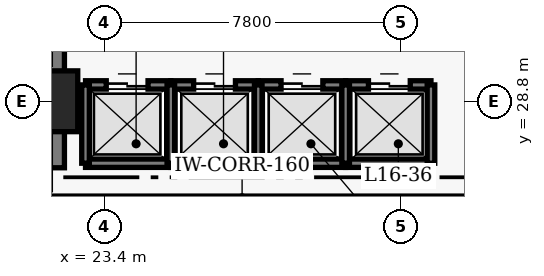
"""IFC4 building model, lengths in metres.
Left out: names, types, materials, properties, quantities, classifications, styles, units other than length and angle.
Written with IfcOpenShell. Run it as: python <this file> out.ifc"""

import sys

from ifc_helpers import new_model, si_unit, direction, frame, frame_2d, origin, origin_2d, place, context, subcontext, project, spatial, rectangle, extrude, element, fill, save


model = new_model("IFC4")
c1 = context("Model", 3, precision=1e-05, world=origin(), true_north=direction((0.0, 1.0)))
c2 = subcontext(c1, "Body", "Model", "MODEL_VIEW")
j1 = project(units=[si_unit("LENGTHUNIT", "METRE"), si_unit("PLANEANGLEUNIT", "RADIAN")], contexts=[c1])
p1 = place(None, origin())
s1 = spatial("IfcSite", under=j1, at=p1, CompositionType="ELEMENT")
p2 = place(p1, origin())
s2 = spatial("IfcBuilding", under=s1, at=p2, CompositionType="ELEMENT")
p3 = place(p2, frame((0.0, 0.0, 67.8)))
s3 = spatial("IfcBuildingStorey", under=s2, at=p3, CompositionType="ELEMENT", Elevation=67.8)
p4 = place(p3, frame((21.9, 27.05, 0.0), z_axis=(0.0, 0.0, 1.0), x_axis=(0.0, 1.0, 0.0)))
e1 = element("IfcWall", 1, at=p4, inside=s3, PredefinedType="SHEAR", context=c2, shape_type="SweptSolid", body=[
    extrude(rectangle(XDim=13.72, YDim=0.9, at=frame_2d((6.86, 0.0))), origin(), (0.0, 0.0, 1.0), 3.8),
])
p5 = place(p3, frame((21.9, 28.8, 0.0), z_axis=(0.0, 0.0, 1.0), x_axis=(1.0, 0.0, 0.0)))
e2 = element("IfcColumn", 2, at=p5, inside=s3, PredefinedType="COLUMN", context=c2, shape_type="SweptSolid", body=[
    extrude(rectangle(XDim=1.6, YDim=1.6, at=origin_2d()), origin(), (0.0, 0.0, 1.0), 3.8),
])
p6 = place(p3, frame((22.905, 29.23, 0.0), z_axis=(0.0, 0.0, 1.0), x_axis=(1.0, 0.0, 0.0)))
e3 = element("IfcWall", 3, at=p6, inside=s3, PredefinedType="SHEAR", context=c2, shape_type="SweptSolid", body=[
    extrude(rectangle(XDim=2.245, YDim=0.22, at=frame_2d((1.123, 0.0))), origin(), (0.0, 0.0, 1.0), 3.8),
])
p7 = place(p6, frame((0.545, 0.0, 0.0)))
e4 = element("IfcOpeningElement", 4, at=p7, cuts=e3, PredefinedType="OPENING", context=c2, shape_type="SweptSolid", body=[
    extrude(rectangle(XDim=1.1, YDim=2.15, at=frame_2d((0.55, 1.075))), frame((0.0, 0.12, 0.0), z_axis=(0.0, -1.0, 0.0), x_axis=(1.0, 0.0, 0.0)), (0.0, 0.0, 1.0), 0.24),
])
p8 = place(p3, frame((22.905, 27.17, 0.0), z_axis=(0.0, 0.0, 1.0), x_axis=(1.0, 0.0, 0.0)))
e5 = element("IfcWall", 5, at=p8, inside=s3, PredefinedType="SHEAR", context=c2, shape_type="SweptSolid", body=[
    extrude(rectangle(XDim=2.245, YDim=0.22, at=frame_2d((1.123, 0.0))), origin(), (0.0, 0.0, 1.0), 3.8),
])
p9 = place(p3, frame((22.905, 27.17, 0.0), z_axis=(0.0, 0.0, 1.0), x_axis=(0.0, 1.0, 0.0)))
e6 = element("IfcWall", 6, at=p9, inside=s3, PredefinedType="SHEAR", context=c2, shape_type="SweptSolid", body=[
    extrude(rectangle(XDim=2.06, YDim=0.2, at=frame_2d((1.03, 0.0))), origin(), (0.0, 0.0, 1.0), 3.8),
])
p10 = place(p3, frame((25.15, 29.23, 0.0), z_axis=(0.0, 0.0, 1.0), x_axis=(1.0, 0.0, 0.0)))
e7 = element("IfcWall", 7, at=p10, inside=s3, PredefinedType="SHEAR", context=c2, shape_type="SweptSolid", body=[
    extrude(rectangle(XDim=2.3, YDim=0.22, at=frame_2d((1.15, 0.0))), origin(), (0.0, 0.0, 1.0), 3.8),
])
p11 = place(p10, frame((0.6, 0.0, 0.0)))
e8 = element("IfcOpeningElement", 8, at=p11, cuts=e7, PredefinedType="OPENING", context=c2, shape_type="SweptSolid", body=[
    extrude(rectangle(XDim=1.1, YDim=2.15, at=frame_2d((0.55, 1.075))), frame((0.0, 0.12, 0.0), z_axis=(0.0, -1.0, 0.0), x_axis=(1.0, 0.0, 0.0)), (0.0, 0.0, 1.0), 0.24),
])
p12 = place(p3, frame((25.15, 27.17, 0.0), z_axis=(0.0, 0.0, 1.0), x_axis=(1.0, 0.0, 0.0)))
e9 = element("IfcWall", 9, at=p12, inside=s3, PredefinedType="SHEAR", context=c2, shape_type="SweptSolid", body=[
    extrude(rectangle(XDim=2.3, YDim=0.22, at=frame_2d((1.15, 0.0))), origin(), (0.0, 0.0, 1.0), 3.8),
])
p13 = place(p3, frame((25.15, 27.17, 0.0), z_axis=(0.0, 0.0, 1.0), x_axis=(0.0, 1.0, 0.0)))
e10 = element("IfcWall", 10, at=p13, inside=s3, PredefinedType="SHEAR", context=c2, shape_type="SweptSolid", body=[
    extrude(rectangle(XDim=2.06, YDim=0.2, at=frame_2d((1.03, 0.0))), origin(), (0.0, 0.0, 1.0), 3.8),
])
p14 = place(p3, frame((27.45, 29.23, 0.0), z_axis=(0.0, 0.0, 1.0), x_axis=(1.0, 0.0, 0.0)))
e11 = element("IfcWall", 11, at=p14, inside=s3, PredefinedType="SHEAR", context=c2, shape_type="SweptSolid", body=[
    extrude(rectangle(XDim=2.3, YDim=0.22, at=frame_2d((1.15, 0.0))), origin(), (0.0, 0.0, 1.0), 3.8),
])
p15 = place(p14, frame((0.6, 0.0, 0.0)))
e12 = element("IfcOpeningElement", 12, at=p15, cuts=e11, PredefinedType="OPENING", context=c2, shape_type="SweptSolid", body=[
    extrude(rectangle(XDim=1.1, YDim=2.15, at=frame_2d((0.55, 1.075))), frame((0.0, 0.12, 0.0), z_axis=(0.0, -1.0, 0.0), x_axis=(1.0, 0.0, 0.0)), (0.0, 0.0, 1.0), 0.24),
])
p16 = place(p3, frame((27.45, 27.17, 0.0), z_axis=(0.0, 0.0, 1.0), x_axis=(1.0, 0.0, 0.0)))
e13 = element("IfcWall", 13, at=p16, inside=s3, PredefinedType="SHEAR", context=c2, shape_type="SweptSolid", body=[
    extrude(rectangle(XDim=2.3, YDim=0.22, at=frame_2d((1.15, 0.0))), origin(), (0.0, 0.0, 1.0), 3.8),
])
p17 = place(p3, frame((27.45, 27.17, 0.0), z_axis=(0.0, 0.0, 1.0), x_axis=(0.0, 1.0, 0.0)))
e14 = element("IfcWall", 14, at=p17, inside=s3, PredefinedType="SHEAR", context=c2, shape_type="SweptSolid", body=[
    extrude(rectangle(XDim=2.06, YDim=0.2, at=frame_2d((1.03, 0.0))), origin(), (0.0, 0.0, 1.0), 3.8),
])
p18 = place(p3, frame((29.75, 29.23, 0.0), z_axis=(0.0, 0.0, 1.0), x_axis=(1.0, 0.0, 0.0)))
e15 = element("IfcWall", 15, at=p18, inside=s3, PredefinedType="SHEAR", context=c2, shape_type="SweptSolid", body=[
    extrude(rectangle(XDim=2.245, YDim=0.22, at=frame_2d((1.123, 0.0))), origin(), (0.0, 0.0, 1.0), 3.8),
])
p19 = place(p18, frame((0.6, 0.0, 0.0)))
e16 = element("IfcOpeningElement", 16, at=p19, cuts=e15, PredefinedType="OPENING", context=c2, shape_type="SweptSolid", body=[
    extrude(rectangle(XDim=1.1, YDim=2.15, at=frame_2d((0.55, 1.075))), frame((0.0, 0.12, 0.0), z_axis=(0.0, -1.0, 0.0), x_axis=(1.0, 0.0, 0.0)), (0.0, 0.0, 1.0), 0.24),
])
p20 = place(p3, frame((29.75, 27.17, 0.0), z_axis=(0.0, 0.0, 1.0), x_axis=(1.0, 0.0, 0.0)))
e17 = element("IfcWall", 17, at=p20, inside=s3, PredefinedType="SHEAR", context=c2, shape_type="SweptSolid", body=[
    extrude(rectangle(XDim=2.245, YDim=0.22, at=frame_2d((1.123, 0.0))), origin(), (0.0, 0.0, 1.0), 3.8),
])
for number, where, z_axis, x_axis in (
    (18, (29.75, 27.17, 0.0), (0.0, 0.0, 1.0), (0.0, 1.0, 0.0)),
    (19, (31.995, 27.17, 0.0), (0.0, 0.0, 1.0), (0.0, 1.0, 0.0)),
):
    element("IfcWall", number, at=place(p3, frame(where, z_axis=z_axis, x_axis=x_axis)), inside=s3, PredefinedType="SHEAR", context=c2, shape_type="SweptSolid", body=[
        extrude(rectangle(XDim=2.06, YDim=0.2, at=frame_2d((1.03, 0.0))), origin(), (0.0, 0.0, 1.0), 3.8),
    ])
p21 = place(p3, frame((20.4, 26.26, 0.0), z_axis=(0.0, 0.0, 1.0), x_axis=(1.0, 0.0, 0.0)))
e20 = element("IfcWall", 20, at=p21, inside=s3, PredefinedType="PARTITIONING", context=c2, shape_type="SweptSolid", body=[
    extrude(rectangle(XDim=13.25, YDim=0.16, at=frame_2d((6.625, 0.0))), origin(), (0.0, 0.0, 1.0), 3.54),
])
p22 = place(p7, origin())
e21 = element("IfcDoor", 21, at=p22, inside=s3, OperationType="DOUBLE_DOOR_SLIDING", PredefinedType="DOOR", context=c2, shape_type="SweptSolid", body=[
    extrude(rectangle(XDim=1.1, YDim=2.15, at=frame_2d((0.55, 1.075))), frame((0.0, 0.025, 0.0), z_axis=(0.0, -1.0, 0.0), x_axis=(1.0, 0.0, 0.0)), (0.0, 0.0, 1.0), 0.05),
])
fill(e4, e21)
p23 = place(p11, origin())
e22 = element("IfcDoor", 22, at=p23, inside=s3, OperationType="DOUBLE_DOOR_SLIDING", PredefinedType="DOOR", context=c2, shape_type="SweptSolid", body=[
    extrude(rectangle(XDim=1.1, YDim=2.15, at=frame_2d((0.55, 1.075))), frame((0.0, 0.025, 0.0), z_axis=(0.0, -1.0, 0.0), x_axis=(1.0, 0.0, 0.0)), (0.0, 0.0, 1.0), 0.05),
])
fill(e8, e22)
p24 = place(p15, origin())
e23 = element("IfcDoor", 23, at=p24, inside=s3, OperationType="DOUBLE_DOOR_SLIDING", PredefinedType="DOOR", context=c2, shape_type="SweptSolid", body=[
    extrude(rectangle(XDim=1.1, YDim=2.15, at=frame_2d((0.55, 1.075))), frame((0.0, 0.025, 0.0), z_axis=(0.0, -1.0, 0.0), x_axis=(1.0, 0.0, 0.0)), (0.0, 0.0, 1.0), 0.05),
])
fill(e12, e23)
p25 = place(p19, origin())
e24 = element("IfcDoor", 24, at=p25, inside=s3, OperationType="DOUBLE_DOOR_SLIDING", PredefinedType="DOOR", context=c2, shape_type="SweptSolid", body=[
    extrude(rectangle(XDim=1.1, YDim=2.15, at=frame_2d((0.55, 1.075))), frame((0.0, 0.025, 0.0), z_axis=(0.0, -1.0, 0.0), x_axis=(1.0, 0.0, 0.0)), (0.0, 0.0, 1.0), 0.05),
])
fill(e16, e24)
save(model, sys.argv[1])
